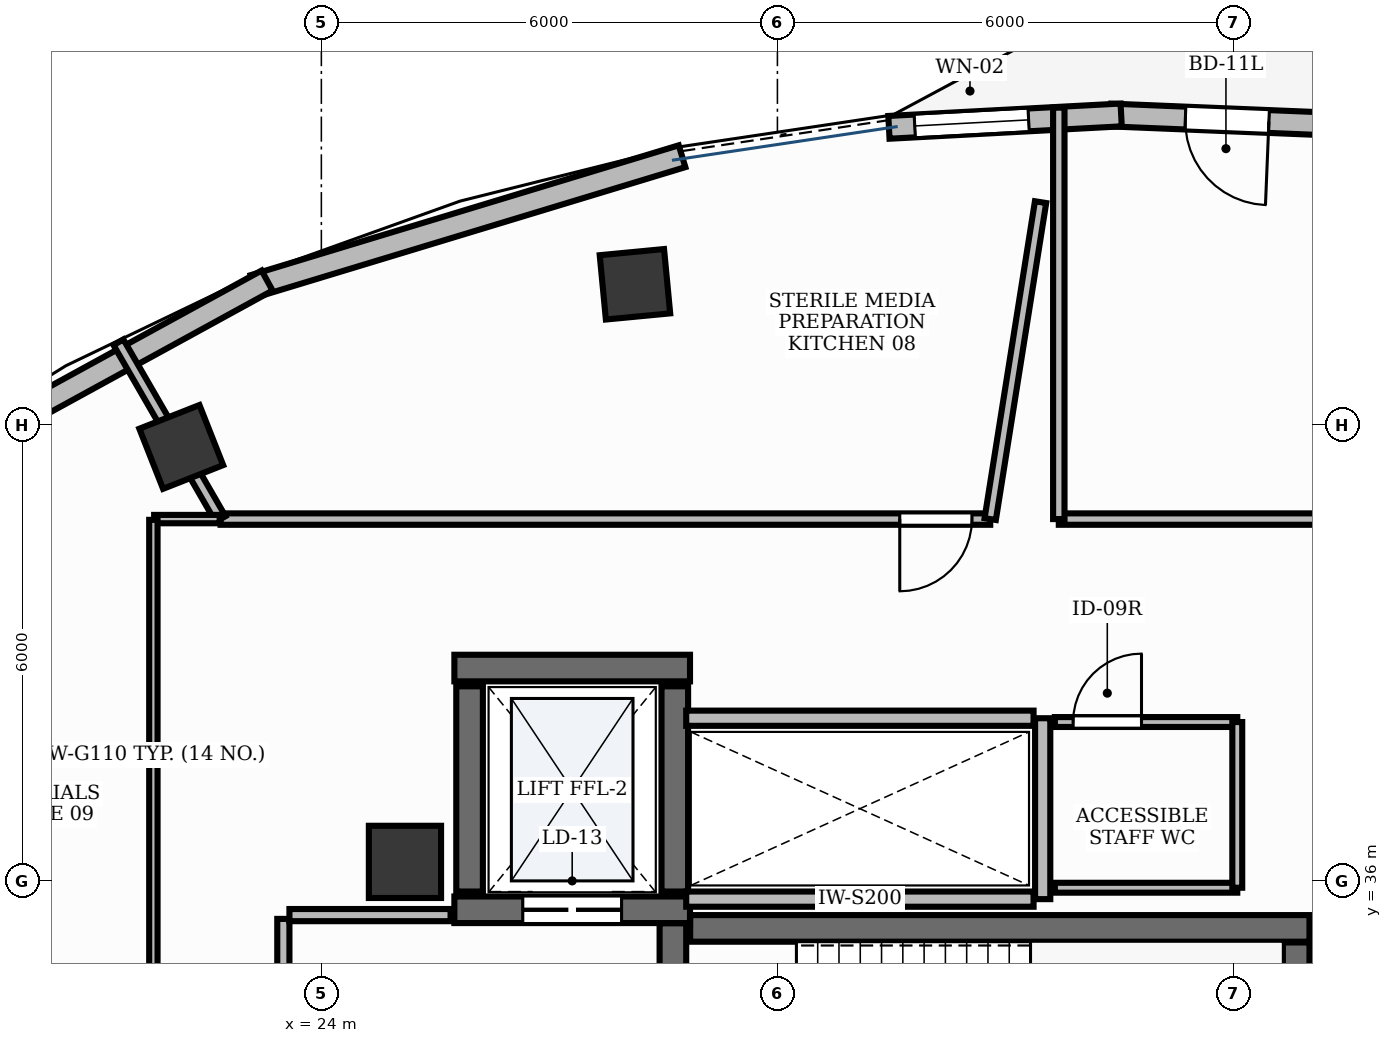
"""IFC4 building model, lengths in metres.
Left out: names, types, materials, properties, quantities, classifications, styles, units other than length and angle.
Written with IfcOpenShell. Run it as: python <this file> out.ifc"""

import sys

from ifc_helpers import new_model, si_unit, direction, frame, frame_2d, origin, origin_2d, place, context, subcontext, project, spatial, rectangle, extrude, element, fill, save


model = new_model("IFC4")
c1 = context("Model", 3, precision=1e-05, world=origin(), true_north=direction((0.0, 1.0)))
c2 = subcontext(c1, "Body", "Model", "MODEL_VIEW")
j1 = project(units=[si_unit("LENGTHUNIT", "METRE"), si_unit("PLANEANGLEUNIT", "RADIAN")], contexts=[c1])
p1 = place(None, origin())
s1 = spatial("IfcSite", under=j1, at=p1, CompositionType="ELEMENT")
p2 = place(p1, origin())
s2 = spatial("IfcBuilding", under=s1, at=p2, CompositionType="ELEMENT")
p3 = place(p2, frame((0.0, 0.0, 286.8)))
s3 = spatial("IfcBuildingStorey", under=s2, at=p3, CompositionType="ELEMENT", Elevation=286.8)
p4 = place(p3, frame((28.852, 35.375, 0.0), z_axis=(0.0, 0.0, 1.0), x_axis=(1.0, 0.0, 0.0)))
e1 = element("IfcWall", 1, at=p4, inside=s3, PredefinedType="SHEAR", context=c2, shape_type="SweptSolid", body=[
    extrude(rectangle(XDim=8.148, YDim=0.35, at=frame_2d((4.074, 0.0))), origin(), (0.0, 0.0, 1.0), 3.9),
])
p5 = place(p3, frame((36.825, 32.11, 0.0), z_axis=(0.0, 0.0, 1.0), x_axis=(0.0, 1.0, 0.0)))
e2 = element("IfcWall", 2, at=p5, inside=s3, PredefinedType="SHEAR", context=c2, shape_type="SweptSolid", body=[
    extrude(rectangle(XDim=3.08, YDim=0.35, at=frame_2d((1.54, 0.0))), origin(), (0.0, 0.0, 1.0), 3.9),
])
p6 = place(p3, frame((28.625, 32.11, 0.0), z_axis=(0.0, 0.0, 1.0), x_axis=(0.0, 1.0, 0.0)))
e3 = element("IfcWall", 3, at=p6, inside=s3, PredefinedType="SHEAR", context=c2, shape_type="SweptSolid", body=[
    extrude(rectangle(XDim=3.333, YDim=0.35, at=frame_2d((1.667, 0.0))), origin(), (0.0, 0.0, 1.0), 3.9),
])
p7 = place(p6, frame((0.2, 0.0, 0.0)))
e4 = element("IfcOpeningElement", 4, at=p7, cuts=e3, PredefinedType="OPENING", context=c2, shape_type="SweptSolid", body=[
    extrude(rectangle(XDim=1.05, YDim=2.15, at=frame_2d((0.525, 1.075))), frame((0.0, 0.19, 0.0), z_axis=(0.0, -1.0, 0.0), x_axis=(1.0, 0.0, 0.0)), (0.0, 0.0, 1.0), 0.38),
])
p8 = place(p3, frame((25.75, 38.8, 0.0), z_axis=(0.0, 0.0, 1.0), x_axis=(1.0, 0.0, 0.0)))
e5 = element("IfcWall", 5, at=p8, inside=s3, PredefinedType="SHEAR", context=c2, shape_type="SweptSolid", body=[
    extrude(rectangle(XDim=3.1, YDim=0.35, at=frame_2d((1.55, 0.0))), origin(), (0.0, 0.0, 1.0), 3.9),
])
p9 = place(p3, frame((25.75, 35.62, 0.0), z_axis=(0.0, 0.0, 1.0), x_axis=(1.0, 0.0, 0.0)))
e6 = element("IfcWall", 6, at=p9, inside=s3, PredefinedType="SHEAR", context=c2, shape_type="SweptSolid", body=[
    extrude(rectangle(XDim=3.1, YDim=0.35, at=frame_2d((1.55, 0.0))), origin(), (0.0, 0.0, 1.0), 3.9),
])
p10 = place(p9, frame((0.9, 0.0, 0.0)))
e7 = element("IfcOpeningElement", 7, at=p10, cuts=e6, PredefinedType="OPENING", context=c2, shape_type="SweptSolid", body=[
    extrude(rectangle(XDim=1.3, YDim=2.2, at=frame_2d((0.65, 1.1))), frame((0.0, 0.19, 0.0), z_axis=(0.0, -1.0, 0.0), x_axis=(1.0, 0.0, 0.0)), (0.0, 0.0, 1.0), 0.38),
])
for number, where, z_axis, x_axis in (
    (8, (25.95, 35.86, 0.0), (0.0, 0.0, 1.0), (0.0, 1.0, 0.0)),
    (9, (28.65, 35.86, 0.0), (0.0, 0.0, 1.0), (0.0, 1.0, 0.0)),
):
    element("IfcWall", number, at=place(p3, frame(where, z_axis=z_axis, x_axis=x_axis)), inside=s3, PredefinedType="SHEAR", context=c2, shape_type="SweptSolid", body=[
        extrude(rectangle(XDim=2.7, YDim=0.35, at=frame_2d((1.35, 0.0))), origin(), (0.0, 0.0, 1.0), 3.9),
    ])
p11 = place(p3, frame((25.1, 36.25, -0.0), z_axis=(0.0, 0.0, 1.0), x_axis=(1.0, 0.0, 0.0)))
e10 = element("IfcColumn", 10, at=p11, inside=s3, PredefinedType="PILASTER", context=c2, shape_type="SweptSolid", body=[
    extrude(rectangle(XDim=0.95, YDim=0.95, at=origin_2d()), origin(), (0.0, 0.0, 1.0), 3.901),
])
for number, where, z_axis, x_axis in (
    (11, (28.126, 43.849, -0.0), (0.0, 0.0, 1.0), (0.995, 0.095, 0.0)),
    (12, (22.157, 41.709, -0.0), (0.0, 0.0, 1.0), (0.93, 0.367, 0.0)),
):
    element("IfcColumn", number, at=place(p3, frame(where, z_axis=z_axis, x_axis=x_axis)), inside=s3, PredefinedType="COLUMN", context=c2, shape_type="SweptSolid", body=[
        extrude(rectangle(XDim=0.85, YDim=0.85, at=origin_2d()), origin(), (0.0, 0.0, 1.0), 3.901),
    ])
p12 = place(p3, frame((37.446, 45.95, 0.0), z_axis=(0.0, 0.0, 1.0), x_axis=(-0.999155735102, 0.041083050186, 0.0)))
e13 = element("IfcWall", 13, at=p12, inside=s3, PredefinedType="STANDARD", context=c2, shape_type="SweptSolid", body=[
    extrude(rectangle(XDim=3.061, YDim=0.3, at=frame_2d((1.53, 0.0))), origin(), (0.0, 0.0, 1.0), 3.47),
])
p13 = place(p12, frame((0.98, 0.0, 0.0)))
e14 = element("IfcOpeningElement", 14, at=p13, cuts=e13, PredefinedType="OPENING", context=c2, shape_type="SweptSolid", body=[
    extrude(rectangle(XDim=1.1, YDim=2.15, at=frame_2d((0.55, 1.075))), frame((0.0, 0.165, 0.0), z_axis=(0.0, -1.0, 0.0), x_axis=(1.0, 0.0, 0.0)), (0.0, 0.0, 1.0), 0.33),
])
p14 = place(p3, frame((34.522, 46.077, 0.0), z_axis=(0.0, 0.0, 1.0), x_axis=(-0.998578313912, -0.053304324252, 0.0)))
e15 = element("IfcWall", 15, at=p14, inside=s3, PredefinedType="STANDARD", context=c2, shape_type="SweptSolid", body=[
    extrude(rectangle(XDim=3.06, YDim=0.3, at=frame_2d((1.53, 0.0))), origin(), (0.0, 0.0, 1.0), 3.47),
])
p15 = place(p14, frame((1.219, 0.0, 0.95)))
e16 = element("IfcOpeningElement", 16, at=p15, cuts=e15, PredefinedType="OPENING", context=c2, shape_type="SweptSolid", body=[
    extrude(rectangle(XDim=1.5, YDim=1.8, at=frame_2d((0.75, 0.9))), frame((0.0, 0.165, 0.0), z_axis=(0.0, -1.0, 0.0), x_axis=(1.0, 0.0, 0.0)), (0.0, 0.0, 1.0), 0.33),
])
p16 = place(p3, frame((28.745, 45.534, 0.0), z_axis=(0.0, 0.0, 1.0), x_axis=(-0.95696124157, -0.290215751008, 0.0)))
e17 = element("IfcWall", 17, at=p16, inside=s3, PredefinedType="STANDARD", context=c2, shape_type="SweptSolid", body=[
    extrude(rectangle(XDim=5.886, YDim=0.3, at=frame_2d((2.943, 0.0))), origin(), (0.0, 0.0, 1.0), 3.9),
])
p17 = place(p3, frame((23.286, 43.898, 0.0), z_axis=(0.0, 0.0, 1.0), x_axis=(-0.877062479499, -0.480376318166, 0.0)))
e18 = element("IfcWall", 18, at=p17, inside=s3, PredefinedType="STANDARD", context=c2, shape_type="SweptSolid", body=[
    extrude(rectangle(XDim=5.654, YDim=0.3, at=frame_2d((2.827, 0.0))), origin(), (0.0, 0.0, 1.0), 3.9),
])
p18 = place(p3, frame((33.49, 35.76, 0.0), z_axis=(0.0, 0.0, 1.0), x_axis=(0.0, 1.0, 0.0)))
e19 = element("IfcWall", 19, at=p18, inside=s3, PredefinedType="PARTITIONING", context=c2, shape_type="SweptSolid", body=[
    extrude(rectangle(XDim=2.38, YDim=0.2, at=frame_2d((1.19, 0.0))), origin(), (0.0, 0.0, 1.0), 2.22),
])
for number, where, z_axis, x_axis in (
    (20, (28.8, 35.76, 0.0), (0.0, 0.0, 1.0), (1.0, 0.0, 0.0)),
    (21, (28.8, 38.14, 0.0), (0.0, 0.0, 1.0), (1.0, 0.0, 0.0)),
):
    element("IfcWall", number, at=place(p3, frame(where, z_axis=z_axis, x_axis=x_axis)), inside=s3, PredefinedType="PARTITIONING", context=c2, shape_type="SweptSolid", body=[
        extrude(rectangle(XDim=4.57, YDim=0.2, at=frame_2d((2.285, 0.0))), origin(), (0.0, 0.0, 1.0), 2.22),
    ])
p19 = place(p3, frame((23.5, 32.1, 0.0), z_axis=(0.0, 0.0, 1.0), x_axis=(0.0, 1.0, 0.0)))
e22 = element("IfcWall", 22, at=p19, inside=s3, PredefinedType="PARTITIONING", context=c2, shape_type="SweptSolid", body=[
    extrude(rectangle(XDim=3.4, YDim=0.16, at=frame_2d((1.7, 0.0))), origin(), (0.0, 0.0, 1.0), 2.22),
])
p20 = place(p19, frame((1.175, 0.0, 0.0)))
e23 = element("IfcOpeningElement", 23, at=p20, cuts=e22, PredefinedType="OPENING", context=c2, shape_type="SweptSolid", body=[
    extrude(rectangle(XDim=1.05, YDim=2.15, at=frame_2d((0.525, 1.075))), frame((0.0, 0.095, 0.0), z_axis=(0.0, -1.0, 0.0), x_axis=(1.0, 0.0, 0.0)), (0.0, 0.0, 1.0), 0.19),
])
p21 = place(p3, frame((23.58, 35.55, 0.0), z_axis=(0.0, 0.0, 1.0), x_axis=(1.0, 0.0, 0.0)))
e24 = element("IfcWall", 24, at=p21, inside=s3, PredefinedType="PARTITIONING", context=c2, shape_type="SweptSolid", body=[
    extrude(rectangle(XDim=2.12, YDim=0.16, at=frame_2d((1.06, 0.0))), origin(), (0.0, 0.0, 1.0), 2.22),
])
p22 = place(p3, frame((33.65, 38.09, 0.0), z_axis=(0.0, 0.0, 1.0), x_axis=(1.0, 0.0, 0.0)))
e25 = element("IfcWall", 25, at=p22, inside=s3, PredefinedType="PARTITIONING", context=c2, shape_type="SweptSolid", body=[
    extrude(rectangle(XDim=2.4, YDim=0.13, at=frame_2d((1.2, 0.0))), origin(), (0.0, 0.0, 1.0), 2.22),
])
p23 = place(p22, frame((0.24, 0.0, 0.0)))
e26 = element("IfcOpeningElement", 26, at=p23, cuts=e25, PredefinedType="OPENING", context=c2, shape_type="SweptSolid", body=[
    extrude(rectangle(XDim=0.9, YDim=2.15, at=frame_2d((0.45, 1.075))), frame((0.0, 0.08, 0.0), z_axis=(0.0, -1.0, 0.0), x_axis=(1.0, 0.0, 0.0)), (0.0, 0.0, 1.0), 0.16),
])
p24 = place(p3, frame((32.8, 40.76, 0.0), z_axis=(0.0, 0.0, 1.0), x_axis=(-1.0, 0.0, 0.0)))
e27 = element("IfcWall", 27, at=p24, inside=s3, PredefinedType="PARTITIONING", context=c2, shape_type="SweptSolid", body=[
    extrude(rectangle(XDim=10.126, YDim=0.15, at=frame_2d((5.063, 0.0))), origin(), (0.0, 0.0, 1.0), 2.22),
])
p25 = place(p24, frame((0.24, 0.0, 0.0)))
e28 = element("IfcOpeningElement", 28, at=p25, cuts=e27, PredefinedType="OPENING", context=c2, shape_type="SweptSolid", body=[
    extrude(rectangle(XDim=0.95, YDim=2.15, at=frame_2d((0.475, 1.075))), frame((0.0, 0.09, 0.0), z_axis=(0.0, -1.0, 0.0), x_axis=(1.0, 0.0, 0.0)), (0.0, 0.0, 1.0), 0.18),
])
p26 = place(p3, frame((36.05, 35.91, 0.0), z_axis=(0.0, 0.0, 1.0), x_axis=(-1.0, 0.0, 0.0)))
e29 = element("IfcWall", 29, at=p26, inside=s3, PredefinedType="PARTITIONING", context=c2, shape_type="SweptSolid", body=[
    extrude(rectangle(XDim=2.4, YDim=0.13, at=frame_2d((1.2, 0.0))), origin(), (0.0, 0.0, 1.0), 2.22),
])
p27 = place(p3, frame((36.05, 38.09, 0.0), z_axis=(0.0, 0.0, 1.0), x_axis=(0.0, -1.0, 0.0)))
e30 = element("IfcWall", 30, at=p27, inside=s3, PredefinedType="PARTITIONING", context=c2, shape_type="SweptSolid", body=[
    extrude(rectangle(XDim=2.18, YDim=0.13, at=frame_2d((1.09, 0.0))), origin(), (0.0, 0.0, 1.0), 2.22),
])
p28 = place(p3, frame((39.4, 40.76, 0.0), z_axis=(0.0, 0.0, 1.0), x_axis=(-1.0, 0.0, 0.0)))
e31 = element("IfcWall", 31, at=p28, inside=s3, PredefinedType="PARTITIONING", context=c2, shape_type="SweptSolid", body=[
    extrude(rectangle(XDim=5.698, YDim=0.15, at=frame_2d((2.849, 0.0))), origin(), (0.0, 0.0, 1.0), 2.22),
])
p29 = place(p3, frame((33.702, 40.76, 0.0), z_axis=(0.0, 0.0, 1.0), x_axis=(0.0, 1.0, 0.0)))
e32 = element("IfcWall", 32, at=p29, inside=s3, PredefinedType="PARTITIONING", context=c2, shape_type="SweptSolid", body=[
    extrude(rectangle(XDim=5.413, YDim=0.15, at=frame_2d((2.707, 0.0))), origin(), (0.0, 0.0, 1.0), 2.22),
])
p30 = place(p3, frame((33.462, 44.93, 0.0), z_axis=(0.0, 0.0, 1.0), x_axis=(-0.156883039615, -0.987617188936, 0.0)))
e33 = element("IfcWall", 33, at=p30, inside=s3, PredefinedType="PARTITIONING", context=c2, shape_type="SweptSolid", body=[
    extrude(rectangle(XDim=4.222, YDim=0.15, at=frame_2d((2.111, 0.0))), origin(), (0.0, 0.0, 1.0), 2.22),
])
p31 = place(p3, frame((22.674, 40.76, 0.0), z_axis=(0.0, 0.0, 1.0), x_axis=(-0.500068617113, 0.865985784051, 0.0)))
e34 = element("IfcWall", 34, at=p31, inside=s3, PredefinedType="PARTITIONING", context=c2, shape_type="SweptSolid", body=[
    extrude(rectangle(XDim=2.686, YDim=0.15, at=frame_2d((1.343, 0.0))), origin(), (0.0, 0.0, 1.0), 2.22),
])
p32 = place(p3, frame((22.662, 40.76, 0.0), z_axis=(0.0, 0.0, 1.0), x_axis=(-1.0, 0.0, 0.0)))
e35 = element("IfcWall", 35, at=p32, inside=s3, PredefinedType="MOVABLE", context=c2, shape_type="SweptSolid", body=[
    extrude(rectangle(XDim=0.862, YDim=0.11, at=frame_2d((0.431, 0.0))), origin(), (0.0, 0.0, 1.0), 2.22),
])
p33 = place(p3, frame((21.79, 40.75, 0.0), z_axis=(0.0, 0.0, 1.0), x_axis=(0.0, -1.0, 0.0)))
e36 = element("IfcWall", 36, at=p33, inside=s3, PredefinedType="MOVABLE", context=c2, shape_type="SweptSolid", body=[
    extrude(rectangle(XDim=6.19, YDim=0.11, at=frame_2d((3.095, 0.0))), origin(), (0.0, 0.0, 1.0), 2.22),
])
p34 = place(p13, origin())
e37 = element("IfcDoor", 37, at=p34, inside=s3, OperationType="SINGLE_SWING_LEFT", PredefinedType="DOOR", context=c2, shape_type="SweptSolid", body=[
    extrude(rectangle(XDim=1.1, YDim=2.15, at=frame_2d((0.55, 1.075))), frame((0.0, 0.025, 0.0), z_axis=(0.0, -1.0, 0.0), x_axis=(1.0, 0.0, 0.0)), (0.0, 0.0, 1.0), 0.05),
])
fill(e14, e37)
p35 = place(p15, origin())
e38 = element("IfcWindow", 38, at=p35, inside=s3, PartitioningType="DOUBLE_PANEL_VERTICAL", PredefinedType="WINDOW", context=c2, shape_type="SweptSolid", body=[
    extrude(rectangle(XDim=1.5, YDim=1.8, at=frame_2d((0.75, 0.9))), frame((0.0, 0.03, 0.0), z_axis=(0.0, -1.0, 0.0), x_axis=(1.0, 0.0, 0.0)), (0.0, 0.0, 1.0), 0.06),
])
fill(e16, e38)
p36 = place(p10, origin())
e39 = element("IfcDoor", 39, at=p36, inside=s3, OperationType="DOUBLE_DOOR_SLIDING", PredefinedType="DOOR", context=c2, shape_type="SweptSolid", body=[
    extrude(rectangle(XDim=1.3, YDim=2.2, at=frame_2d((0.65, 1.1))), frame((0.0, 0.025, 0.0), z_axis=(0.0, -1.0, 0.0), x_axis=(1.0, 0.0, 0.0)), (0.0, 0.0, 1.0), 0.05),
])
fill(e7, e39)
p37 = place(p23, origin())
e40 = element("IfcDoor", 40, at=p37, inside=s3, OperationType="SINGLE_SWING_RIGHT", PredefinedType="DOOR", context=c2, shape_type="SweptSolid", body=[
    extrude(rectangle(XDim=0.9, YDim=2.15, at=frame_2d((0.45, 1.075))), frame((0.0, 0.025, 0.0), z_axis=(0.0, -1.0, 0.0), x_axis=(1.0, 0.0, 0.0)), (0.0, 0.0, 1.0), 0.05),
])
fill(e26, e40)
p38 = place(p25, origin())
e41 = element("IfcDoor", 41, at=p38, inside=s3, OperationType="SINGLE_SWING_RIGHT", PredefinedType="DOOR", context=c2, shape_type="SweptSolid", body=[
    extrude(rectangle(XDim=0.95, YDim=2.15, at=frame_2d((0.475, 1.075))), frame((0.0, 0.025, 0.0), z_axis=(0.0, -1.0, 0.0), x_axis=(1.0, 0.0, 0.0)), (0.0, 0.0, 1.0), 0.05),
])
fill(e28, e41)
save(model, sys.argv[1])
